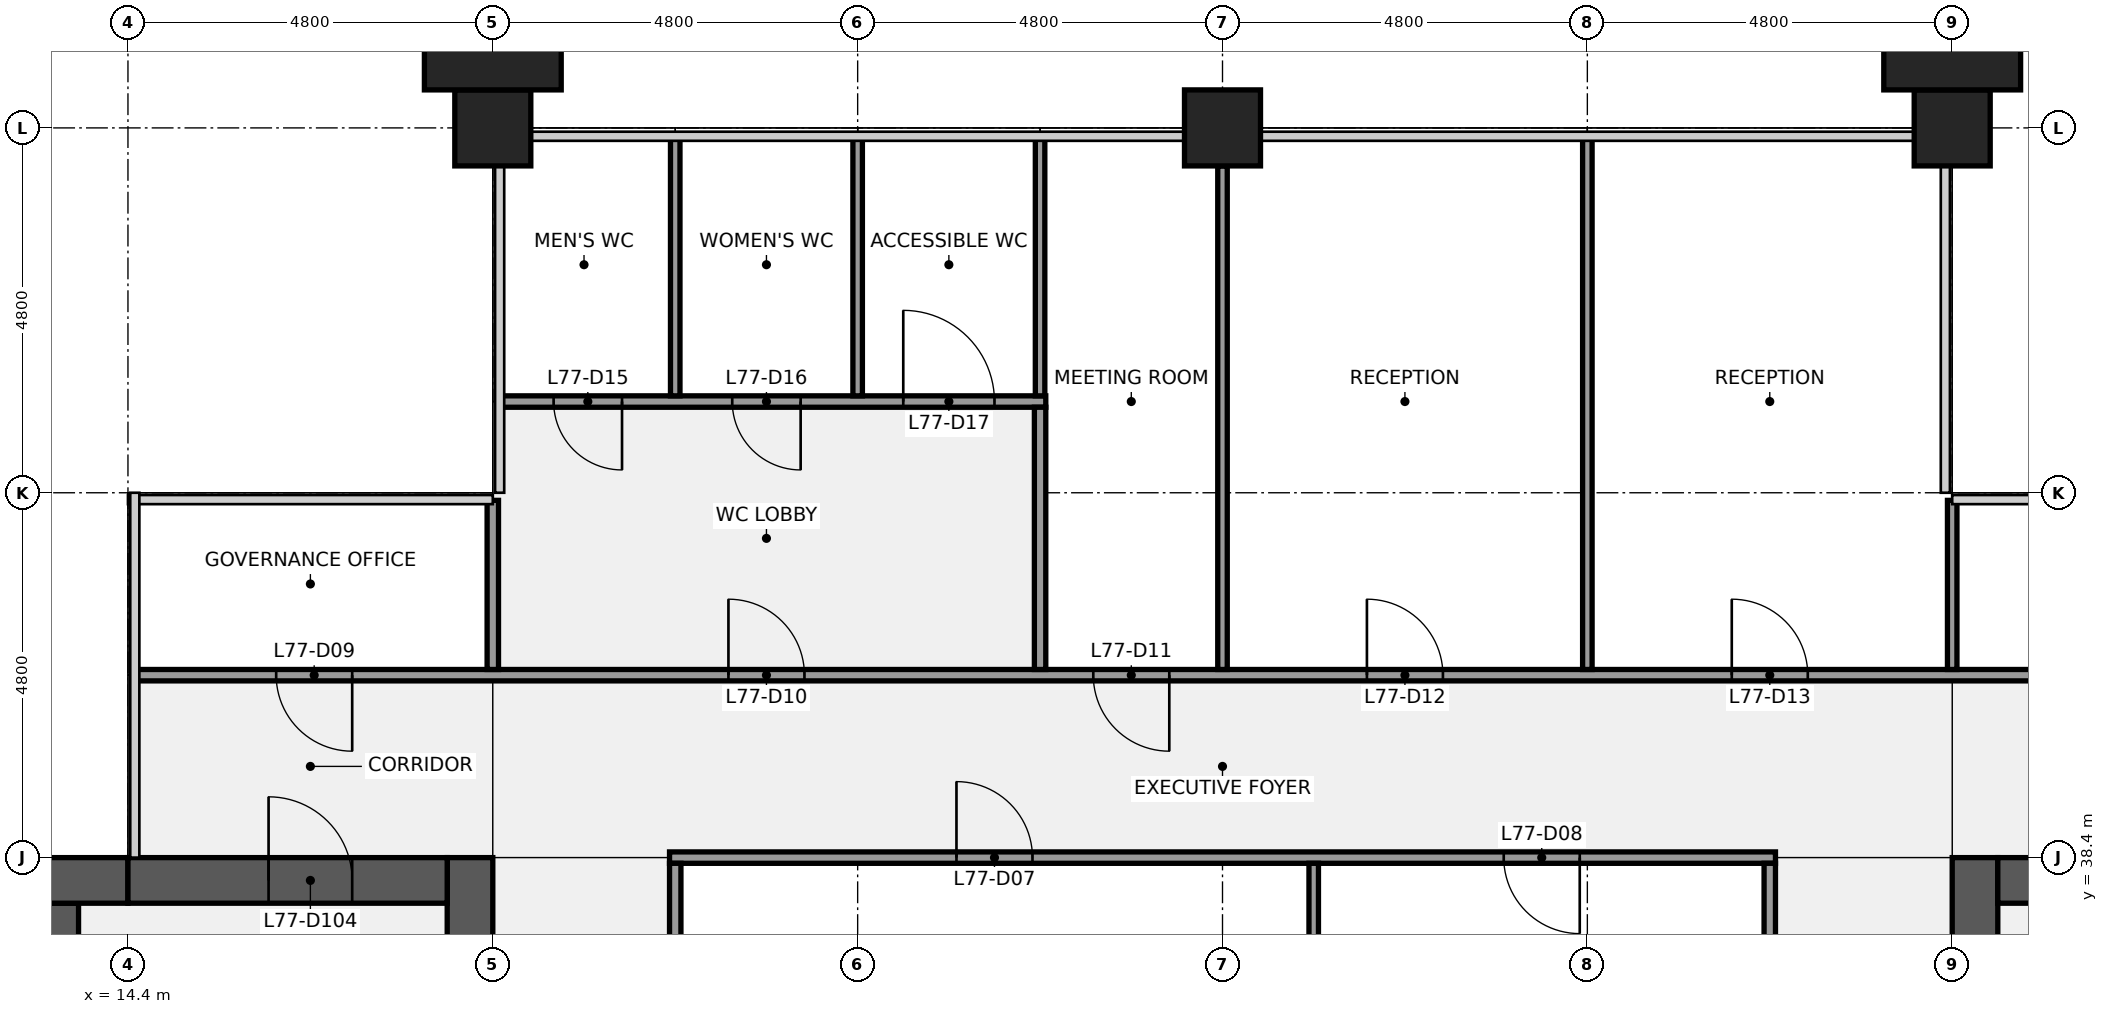
"""IFC4 building model, lengths in metres.
Left out: names, types, materials, properties, quantities, classifications, styles, units other than length and angle.
Written with IfcOpenShell. Run it as: python <this file> out.ifc"""

import sys

from ifc_helpers import new_model, si_unit, direction, frame, frame_2d, origin, origin_2d, place, context, subcontext, project, spatial, rectangle, extrude, element, fill, save


model = new_model("IFC4")
c1 = context("Model", 3, precision=1e-05, world=origin(), true_north=direction((0.0, 1.0)))
c2 = subcontext(c1, "Body", "Model", "MODEL_VIEW")
j1 = project(units=[si_unit("LENGTHUNIT", "METRE"), si_unit("PLANEANGLEUNIT", "RADIAN")], contexts=[c1])
p1 = place(None, origin())
s1 = spatial("IfcSite", under=j1, at=p1, CompositionType="ELEMENT")
p2 = place(p1, origin())
s2 = spatial("IfcBuilding", under=s1, at=p2, CompositionType="ELEMENT")
p3 = place(p2, frame((0.0, 0.0, 346.3)))
s3 = spatial("IfcBuildingStorey", under=s2, at=p3, CompositionType="ELEMENT", Elevation=346.3)
for number, where, z_axis, x_axis in (
    (1, (19.2, 48.0, 0.0), (0.0, 0.0, 1.0), (1.0, 0.0, 0.0)),
    (2, (28.8, 48.0, 0.0), (0.0, 0.0, 1.0), (1.0, 0.0, 0.0)),
    (3, (38.4, 48.0, 0.0), (0.0, 0.0, 1.0), (1.0, 0.0, 0.0)),
):
    element("IfcColumn", number, at=place(p3, frame(where, z_axis=z_axis, x_axis=x_axis)), inside=s3, PredefinedType="COLUMN", context=c2, shape_type="SweptSolid", body=[
        extrude(rectangle(XDim=1.0, YDim=1.0, at=origin_2d()), origin(), (0.0, 0.0, 1.0), 4.0),
    ])
p4 = place(p3, frame((18.9, 38.4, 0.0), z_axis=(0.0, 0.0, 1.0), x_axis=(0.0, -1.0, 0.0)))
e4 = element("IfcWall", 4, at=p4, inside=s3, PredefinedType="SHEAR", context=c2, shape_type="SweptSolid", body=[
    extrude(rectangle(XDim=28.8, YDim=0.6, at=frame_2d((14.4, 0.0))), origin(), (0.0, 0.0, 1.0), 3.84),
])
p5 = place(p4, frame((18.3, 0.0, 0.0)))
e5 = element("IfcOpeningElement", 5, at=p5, cuts=e4, PredefinedType="OPENING", context=c2, shape_type="SweptSolid", body=[
    extrude(rectangle(XDim=1.8, YDim=2.1, at=frame_2d((0.9, 1.05))), frame((0.0, 0.31, 0.0), z_axis=(0.0, -1.0, 0.0), x_axis=(1.0, 0.0, 0.0)), (0.0, 0.0, 1.0), 0.62),
])
p6 = place(p4, frame((8.7, 0.0, 0.0)))
e6 = element("IfcOpeningElement", 6, at=p6, cuts=e4, PredefinedType="OPENING", context=c2, shape_type="SweptSolid", body=[
    extrude(rectangle(XDim=1.8, YDim=2.1, at=frame_2d((0.9, 1.05))), frame((0.0, 0.31, 0.0), z_axis=(0.0, -1.0, 0.0), x_axis=(1.0, 0.0, 0.0)), (0.0, 0.0, 1.0), 0.62),
])
p7 = place(p3, frame((6.25, 37.5, 0.0), z_axis=(0.0, 0.0, 1.0), x_axis=(1.0, 0.0, 0.0)))
e7 = element("IfcWall", 7, at=p7, inside=s3, PredefinedType="SHEAR", context=c2, shape_type="SweptSolid", body=[
    extrude(rectangle(XDim=7.5, YDim=0.6, at=frame_2d((3.75, 0.0))), origin(), (0.0, 0.0, 1.0), 3.84),
])
p8 = place(p3, frame((0.6, 38.1, 0.0), z_axis=(0.0, 0.0, 1.0), x_axis=(1.0, 0.0, 0.0)))
e8 = element("IfcWall", 8, at=p8, inside=s3, PredefinedType="SHEAR", context=c2, shape_type="SweptSolid", body=[
    extrude(rectangle(XDim=13.8, YDim=0.6, at=frame_2d((6.9, 0.0))), origin(), (0.0, 0.0, 1.0), 3.84),
])
p9 = place(p8, frame((5.7, 0.0, 0.9)))
e9 = element("IfcOpeningElement", 9, at=p9, cuts=e8, PredefinedType="OPENING", context=c2, shape_type="SweptSolid", body=[
    extrude(rectangle(XDim=1.8, YDim=1.5, at=frame_2d((0.9, 0.75))), frame((0.0, 0.31, 0.0), z_axis=(0.0, -1.0, 0.0), x_axis=(1.0, 0.0, 0.0)), (0.0, 0.0, 1.0), 0.62),
])
p10 = place(p8, frame((10.5, 0.0, 0.9)))
e10 = element("IfcOpeningElement", 10, at=p10, cuts=e8, PredefinedType="OPENING", context=c2, shape_type="SweptSolid", body=[
    extrude(rectangle(XDim=1.8, YDim=1.5, at=frame_2d((0.9, 0.75))), frame((0.0, 0.31, 0.0), z_axis=(0.0, -1.0, 0.0), x_axis=(1.0, 0.0, 0.0)), (0.0, 0.0, 1.0), 0.62),
])
p11 = place(p3, frame((14.4, 38.1, 0.0), z_axis=(0.0, 0.0, 1.0), x_axis=(1.0, 0.0, 0.0)))
e11 = element("IfcWall", 11, at=p11, inside=s3, PredefinedType="SHEAR", context=c2, shape_type="SweptSolid", body=[
    extrude(rectangle(XDim=4.2, YDim=0.6, at=frame_2d((2.1, 0.0))), origin(), (0.0, 0.0, 1.0), 3.84),
])
p12 = place(p11, frame((1.85, 0.0, 0.0)))
e12 = element("IfcOpeningElement", 12, at=p12, cuts=e11, PredefinedType="OPENING", context=c2, shape_type="SweptSolid", body=[
    extrude(rectangle(XDim=1.1, YDim=2.1, at=frame_2d((0.55, 1.05))), frame((0.0, 0.31, 0.0), z_axis=(0.0, -1.0, 0.0), x_axis=(1.0, 0.0, 0.0)), (0.0, 0.0, 1.0), 0.62),
])
p13 = place(p3, frame((38.7, 9.6, 0.0), z_axis=(0.0, 0.0, 1.0), x_axis=(0.0, 1.0, 0.0)))
e13 = element("IfcWall", 13, at=p13, inside=s3, PredefinedType="SHEAR", context=c2, shape_type="SweptSolid", body=[
    extrude(rectangle(XDim=28.8, YDim=0.6, at=frame_2d((14.4, 0.0))), origin(), (0.0, 0.0, 1.0), 3.84),
])
p14 = place(p13, frame((8.7, 0.0, 0.0)))
e14 = element("IfcOpeningElement", 14, at=p14, cuts=e13, PredefinedType="OPENING", context=c2, shape_type="SweptSolid", body=[
    extrude(rectangle(XDim=1.8, YDim=2.1, at=frame_2d((0.9, 1.05))), frame((0.0, 0.31, 0.0), z_axis=(0.0, -1.0, 0.0), x_axis=(1.0, 0.0, 0.0)), (0.0, 0.0, 1.0), 0.62),
])
p15 = place(p13, frame((18.3, 0.0, 0.0)))
e15 = element("IfcOpeningElement", 15, at=p15, cuts=e13, PredefinedType="OPENING", context=c2, shape_type="SweptSolid", body=[
    extrude(rectangle(XDim=1.8, YDim=2.1, at=frame_2d((0.9, 1.05))), frame((0.0, 0.31, 0.0), z_axis=(0.0, -1.0, 0.0), x_axis=(1.0, 0.0, 0.0)), (0.0, 0.0, 1.0), 0.62),
])
p16 = place(p3, frame((39.0, 38.1, 0.0), z_axis=(0.0, 0.0, 1.0), x_axis=(1.0, 0.0, 0.0)))
e16 = element("IfcWall", 16, at=p16, inside=s3, PredefinedType="SHEAR", context=c2, shape_type="SweptSolid", body=[
    extrude(rectangle(XDim=4.2, YDim=0.6, at=frame_2d((2.1, 0.0))), origin(), (0.0, 0.0, 1.0), 3.84),
])
p17 = place(p16, frame((1.25, 0.0, 0.0)))
e17 = element("IfcOpeningElement", 17, at=p17, cuts=e16, PredefinedType="OPENING", context=c2, shape_type="SweptSolid", body=[
    extrude(rectangle(XDim=1.1, YDim=2.1, at=frame_2d((0.55, 1.05))), frame((0.0, 0.31, 0.0), z_axis=(0.0, -1.0, 0.0), x_axis=(1.0, 0.0, 0.0)), (0.0, 0.0, 1.0), 0.62),
])
p18 = place(p3, frame((21.525, 38.4, 0.0), z_axis=(0.0, 0.0, 1.0), x_axis=(1.0, 0.0, 0.0)))
e18 = element("IfcWall", 18, at=p18, inside=s3, PredefinedType="PARTITIONING", context=c2, shape_type="SweptSolid", body=[
    extrude(rectangle(XDim=14.55, YDim=0.15, at=frame_2d((7.275, 0.0))), origin(), (0.0, 0.0, 1.0), 2.849),
])
p19 = place(p18, frame((3.775, 0.0, 0.0)))
e19 = element("IfcOpeningElement", 19, at=p19, cuts=e18, PredefinedType="OPENING", context=c2, shape_type="SweptSolid", body=[
    extrude(rectangle(XDim=1.0, YDim=2.1, at=frame_2d((0.5, 1.05))), frame((0.0, 0.085, 0.0), z_axis=(0.0, -1.0, 0.0), x_axis=(1.0, 0.0, 0.0)), (0.0, 0.0, 1.0), 0.17),
])
p20 = place(p18, frame((10.975, 0.0, 0.0)))
e20 = element("IfcOpeningElement", 20, at=p20, cuts=e18, PredefinedType="OPENING", context=c2, shape_type="SweptSolid", body=[
    extrude(rectangle(XDim=1.0, YDim=2.1, at=frame_2d((0.5, 1.05))), frame((0.0, 0.085, 0.0), z_axis=(0.0, -1.0, 0.0), x_axis=(1.0, 0.0, 0.0)), (0.0, 0.0, 1.0), 0.17),
])
p21 = place(p3, frame((14.5, 40.8, 0.0), z_axis=(0.0, 0.0, 1.0), x_axis=(1.0, 0.0, 0.0)))
e21 = element("IfcWall", 21, at=p21, inside=s3, PredefinedType="PARTITIONING", context=c2, shape_type="SweptSolid", body=[
    extrude(rectangle(XDim=28.6, YDim=0.15, at=frame_2d((14.3, 0.0))), origin(), (0.0, 0.0, 1.0), 2.849),
])
p22 = place(p21, frame((1.85, 0.0, 0.0)))
e22 = element("IfcOpeningElement", 22, at=p22, cuts=e21, PredefinedType="OPENING", context=c2, shape_type="SweptSolid", body=[
    extrude(rectangle(XDim=1.0, YDim=2.1, at=frame_2d((0.5, 1.05))), frame((0.0, 0.085, 0.0), z_axis=(0.0, -1.0, 0.0), x_axis=(1.0, 0.0, 0.0)), (0.0, 0.0, 1.0), 0.17),
])
p23 = place(p21, frame((7.8, 0.0, 0.0)))
e23 = element("IfcOpeningElement", 23, at=p23, cuts=e21, PredefinedType="OPENING", context=c2, shape_type="SweptSolid", body=[
    extrude(rectangle(XDim=1.0, YDim=2.1, at=frame_2d((0.5, 1.05))), frame((0.0, 0.085, 0.0), z_axis=(0.0, -1.0, 0.0), x_axis=(1.0, 0.0, 0.0)), (0.0, 0.0, 1.0), 0.17),
])
p24 = place(p21, frame((12.6, 0.0, 0.0)))
e24 = element("IfcOpeningElement", 24, at=p24, cuts=e21, PredefinedType="OPENING", context=c2, shape_type="SweptSolid", body=[
    extrude(rectangle(XDim=1.0, YDim=2.1, at=frame_2d((0.5, 1.05))), frame((0.0, 0.085, 0.0), z_axis=(0.0, -1.0, 0.0), x_axis=(1.0, 0.0, 0.0)), (0.0, 0.0, 1.0), 0.17),
])
p25 = place(p21, frame((16.2, 0.0, 0.0)))
e25 = element("IfcOpeningElement", 25, at=p25, cuts=e21, PredefinedType="OPENING", context=c2, shape_type="SweptSolid", body=[
    extrude(rectangle(XDim=1.0, YDim=2.1, at=frame_2d((0.5, 1.05))), frame((0.0, 0.085, 0.0), z_axis=(0.0, -1.0, 0.0), x_axis=(1.0, 0.0, 0.0)), (0.0, 0.0, 1.0), 0.17),
])
p26 = place(p21, frame((21.0, 0.0, 0.0)))
e26 = element("IfcOpeningElement", 26, at=p26, cuts=e21, PredefinedType="OPENING", context=c2, shape_type="SweptSolid", body=[
    extrude(rectangle(XDim=1.0, YDim=2.1, at=frame_2d((0.5, 1.05))), frame((0.0, 0.085, 0.0), z_axis=(0.0, -1.0, 0.0), x_axis=(1.0, 0.0, 0.0)), (0.0, 0.0, 1.0), 0.17),
])
p27 = place(p21, frame((25.75, 0.0, 0.0)))
e27 = element("IfcOpeningElement", 27, at=p27, cuts=e21, PredefinedType="OPENING", context=c2, shape_type="SweptSolid", body=[
    extrude(rectangle(XDim=1.0, YDim=2.1, at=frame_2d((0.5, 1.05))), frame((0.0, 0.085, 0.0), z_axis=(0.0, -1.0, 0.0), x_axis=(1.0, 0.0, 0.0)), (0.0, 0.0, 1.0), 0.17),
])
p28 = place(p3, frame((19.3, 44.4, 0.0), z_axis=(0.0, 0.0, 1.0), x_axis=(1.0, 0.0, 0.0)))
e28 = element("IfcWall", 28, at=p28, inside=s3, PredefinedType="PARTITIONING", context=c2, shape_type="SweptSolid", body=[
    extrude(rectangle(XDim=7.175, YDim=0.15, at=frame_2d((3.587, 0.0))), origin(), (0.0, 0.0, 1.0), 2.849),
])
p29 = place(p28, frame((0.7, 0.0, 0.0)))
e29 = element("IfcOpeningElement", 29, at=p29, cuts=e28, PredefinedType="OPENING", context=c2, shape_type="SweptSolid", body=[
    extrude(rectangle(XDim=0.9, YDim=2.1, at=frame_2d((0.45, 1.05))), frame((0.0, 0.085, 0.0), z_axis=(0.0, -1.0, 0.0), x_axis=(1.0, 0.0, 0.0)), (0.0, 0.0, 1.0), 0.17),
])
p30 = place(p28, frame((3.05, 0.0, 0.0)))
e30 = element("IfcOpeningElement", 30, at=p30, cuts=e28, PredefinedType="OPENING", context=c2, shape_type="SweptSolid", body=[
    extrude(rectangle(XDim=0.9, YDim=2.1, at=frame_2d((0.45, 1.05))), frame((0.0, 0.085, 0.0), z_axis=(0.0, -1.0, 0.0), x_axis=(1.0, 0.0, 0.0)), (0.0, 0.0, 1.0), 0.17),
])
p31 = place(p28, frame((5.3, 0.0, 0.0)))
e31 = element("IfcOpeningElement", 31, at=p31, cuts=e28, PredefinedType="OPENING", context=c2, shape_type="SweptSolid", body=[
    extrude(rectangle(XDim=1.2, YDim=2.1, at=frame_2d((0.6, 1.05))), frame((0.0, 0.085, 0.0), z_axis=(0.0, -1.0, 0.0), x_axis=(1.0, 0.0, 0.0)), (0.0, 0.0, 1.0), 0.17),
])
p32 = place(p3, frame((19.2, 40.875, 0.0), z_axis=(0.0, 0.0, 1.0), x_axis=(0.0, 1.0, 0.0)))
e32 = element("IfcWall", 32, at=p32, inside=s3, PredefinedType="PARTITIONING", context=c2, shape_type="SweptSolid", body=[
    extrude(rectangle(XDim=2.225, YDim=0.15, at=frame_2d((1.113, 0.0))), origin(), (0.0, 0.0, 1.0), 2.849),
])
p33 = place(p3, frame((21.6, 44.475, 0.0), z_axis=(0.0, 0.0, 1.0), x_axis=(0.0, 1.0, 0.0)))
e33 = element("IfcWall", 33, at=p33, inside=s3, PredefinedType="PARTITIONING", context=c2, shape_type="SweptSolid", body=[
    extrude(rectangle(XDim=3.425, YDim=0.125, at=frame_2d((1.712, 0.0))), origin(), (0.0, 0.0, 1.0), 2.849),
])
p34 = place(p3, frame((21.6, 33.675, 0.0), z_axis=(0.0, 0.0, 1.0), x_axis=(0.0, 1.0, 0.0)))
e34 = element("IfcWall", 34, at=p34, inside=s3, PredefinedType="PARTITIONING", context=c2, shape_type="SweptSolid", body=[
    extrude(rectangle(XDim=4.65, YDim=0.15, at=frame_2d((2.325, 0.0))), origin(), (0.0, 0.0, 1.0), 2.849),
])
for number, where, z_axis, x_axis in (
    (35, (24.0, 44.475, 0.0), (0.0, 0.0, 1.0), (0.0, 1.0, 0.0)),
    (36, (26.4, 44.475, 0.0), (0.0, 0.0, 1.0), (0.0, 1.0, 0.0)),
):
    element("IfcWall", number, at=place(p3, frame(where, z_axis=z_axis, x_axis=x_axis)), inside=s3, PredefinedType="PARTITIONING", context=c2, shape_type="SweptSolid", body=[
        extrude(rectangle(XDim=3.425, YDim=0.125, at=frame_2d((1.712, 0.0))), origin(), (0.0, 0.0, 1.0), 2.849),
    ])
p35 = place(p3, frame((26.4, 40.875, 0.0), z_axis=(0.0, 0.0, 1.0), x_axis=(0.0, 1.0, 0.0)))
e37 = element("IfcWall", 37, at=p35, inside=s3, PredefinedType="PARTITIONING", context=c2, shape_type="SweptSolid", body=[
    extrude(rectangle(XDim=3.45, YDim=0.15, at=frame_2d((1.725, 0.0))), origin(), (0.0, 0.0, 1.0), 2.849),
])
p36 = place(p3, frame((28.8, 40.875, 0.0), z_axis=(0.0, 0.0, 1.0), x_axis=(0.0, 1.0, 0.0)))
e38 = element("IfcWall", 38, at=p36, inside=s3, PredefinedType="PARTITIONING", context=c2, shape_type="SweptSolid", body=[
    extrude(rectangle(XDim=6.625, YDim=0.125, at=frame_2d((3.312, 0.0))), origin(), (0.0, 0.0, 1.0), 2.849),
])
p37 = place(p3, frame((30.0, 33.663, 0.0), z_axis=(0.0, 0.0, 1.0), x_axis=(0.0, 1.0, 0.0)))
e39 = element("IfcWall", 39, at=p37, inside=s3, PredefinedType="PARTITIONING", context=c2, shape_type="SweptSolid", body=[
    extrude(rectangle(XDim=4.662, YDim=0.125, at=frame_2d((2.331, 0.0))), origin(), (0.0, 0.0, 1.0), 2.849),
])
p38 = place(p3, frame((33.6, 40.875, 0.0), z_axis=(0.0, 0.0, 1.0), x_axis=(0.0, 1.0, 0.0)))
e40 = element("IfcWall", 40, at=p38, inside=s3, PredefinedType="PARTITIONING", context=c2, shape_type="SweptSolid", body=[
    extrude(rectangle(XDim=7.025, YDim=0.125, at=frame_2d((3.512, 0.0))), origin(), (0.0, 0.0, 1.0), 2.849),
])
p39 = place(p3, frame((36.0, 33.675, 0.0), z_axis=(0.0, 0.0, 1.0), x_axis=(0.0, 1.0, 0.0)))
e41 = element("IfcWall", 41, at=p39, inside=s3, PredefinedType="PARTITIONING", context=c2, shape_type="SweptSolid", body=[
    extrude(rectangle(XDim=4.65, YDim=0.15, at=frame_2d((2.325, 0.0))), origin(), (0.0, 0.0, 1.0), 2.849),
])
p40 = place(p3, frame((38.4, 40.875, 0.0), z_axis=(0.0, 0.0, 1.0), x_axis=(0.0, 1.0, 0.0)))
e42 = element("IfcWall", 42, at=p40, inside=s3, PredefinedType="PARTITIONING", context=c2, shape_type="SweptSolid", body=[
    extrude(rectangle(XDim=2.225, YDim=0.125, at=frame_2d((1.113, 0.0))), origin(), (0.0, 0.0, 1.0), 2.849),
])
for number, where, z_axis, x_axis in (
    (43, (19.2, 49.0, 0.0), (0.0, 0.0, 1.0), (1.0, 0.0, 0.0)),
    (44, (38.4, 49.0, 0.0), (0.0, 0.0, 1.0), (1.0, 0.0, 0.0)),
):
    element("IfcColumn", number, at=place(p3, frame(where, z_axis=z_axis, x_axis=x_axis)), inside=s3, PredefinedType="PILASTER", context=c2, shape_type="SweptSolid", body=[
        extrude(rectangle(XDim=1.8, YDim=1.0, at=origin_2d()), origin(), (0.0, 0.0, 1.0), 4.0),
    ])
p41 = place(p12, origin())
e45 = element("IfcDoor", 45, at=p41, inside=s3, OperationType="SINGLE_SWING_LEFT", PredefinedType="DOOR", context=c2, shape_type="SweptSolid", body=[
    extrude(rectangle(XDim=1.1, YDim=2.1, at=frame_2d((0.55, 1.05))), frame((0.0, 0.025, 0.0), z_axis=(0.0, -1.0, 0.0), x_axis=(1.0, 0.0, 0.0)), (0.0, 0.0, 1.0), 0.05),
])
fill(e12, e45)
p42 = place(p19, origin())
e46 = element("IfcDoor", 46, at=p42, inside=s3, OperationType="SINGLE_SWING_LEFT", PredefinedType="DOOR", context=c2, shape_type="SweptSolid", body=[
    extrude(rectangle(XDim=1.0, YDim=2.1, at=frame_2d((0.5, 1.05))), frame((0.0, 0.025, 0.0), z_axis=(0.0, -1.0, 0.0), x_axis=(1.0, 0.0, 0.0)), (0.0, 0.0, 1.0), 0.05),
])
fill(e19, e46)
p43 = place(p20, origin())
e47 = element("IfcDoor", 47, at=p43, inside=s3, OperationType="SINGLE_SWING_RIGHT", PredefinedType="DOOR", context=c2, shape_type="SweptSolid", body=[
    extrude(rectangle(XDim=1.0, YDim=2.1, at=frame_2d((0.5, 1.05))), frame((0.0, 0.025, 0.0), z_axis=(0.0, -1.0, 0.0), x_axis=(1.0, 0.0, 0.0)), (0.0, 0.0, 1.0), 0.05),
])
fill(e20, e47)
p44 = place(p22, origin())
e48 = element("IfcDoor", 48, at=p44, inside=s3, OperationType="SINGLE_SWING_RIGHT", PredefinedType="DOOR", context=c2, shape_type="SweptSolid", body=[
    extrude(rectangle(XDim=1.0, YDim=2.1, at=frame_2d((0.5, 1.05))), frame((0.0, 0.025, 0.0), z_axis=(0.0, -1.0, 0.0), x_axis=(1.0, 0.0, 0.0)), (0.0, 0.0, 1.0), 0.05),
])
fill(e22, e48)
p45 = place(p23, origin())
e49 = element("IfcDoor", 49, at=p45, inside=s3, OperationType="SINGLE_SWING_LEFT", PredefinedType="DOOR", context=c2, shape_type="SweptSolid", body=[
    extrude(rectangle(XDim=1.0, YDim=2.1, at=frame_2d((0.5, 1.05))), frame((0.0, 0.025, 0.0), z_axis=(0.0, -1.0, 0.0), x_axis=(1.0, 0.0, 0.0)), (0.0, 0.0, 1.0), 0.05),
])
fill(e23, e49)
p46 = place(p24, origin())
e50 = element("IfcDoor", 50, at=p46, inside=s3, OperationType="SINGLE_SWING_RIGHT", PredefinedType="DOOR", context=c2, shape_type="SweptSolid", body=[
    extrude(rectangle(XDim=1.0, YDim=2.1, at=frame_2d((0.5, 1.05))), frame((0.0, 0.025, 0.0), z_axis=(0.0, -1.0, 0.0), x_axis=(1.0, 0.0, 0.0)), (0.0, 0.0, 1.0), 0.05),
])
fill(e24, e50)
p47 = place(p25, origin())
e51 = element("IfcDoor", 51, at=p47, inside=s3, OperationType="SINGLE_SWING_LEFT", PredefinedType="DOOR", context=c2, shape_type="SweptSolid", body=[
    extrude(rectangle(XDim=1.0, YDim=2.1, at=frame_2d((0.5, 1.05))), frame((0.0, 0.025, 0.0), z_axis=(0.0, -1.0, 0.0), x_axis=(1.0, 0.0, 0.0)), (0.0, 0.0, 1.0), 0.05),
])
fill(e25, e51)
p48 = place(p26, origin())
e52 = element("IfcDoor", 52, at=p48, inside=s3, OperationType="SINGLE_SWING_LEFT", PredefinedType="DOOR", context=c2, shape_type="SweptSolid", body=[
    extrude(rectangle(XDim=1.0, YDim=2.1, at=frame_2d((0.5, 1.05))), frame((0.0, 0.025, 0.0), z_axis=(0.0, -1.0, 0.0), x_axis=(1.0, 0.0, 0.0)), (0.0, 0.0, 1.0), 0.05),
])
fill(e26, e52)
p49 = place(p29, origin())
e53 = element("IfcDoor", 53, at=p49, inside=s3, OperationType="SINGLE_SWING_RIGHT", PredefinedType="DOOR", context=c2, shape_type="SweptSolid", body=[
    extrude(rectangle(XDim=0.9, YDim=2.1, at=frame_2d((0.45, 1.05))), frame((0.0, 0.025, 0.0), z_axis=(0.0, -1.0, 0.0), x_axis=(1.0, 0.0, 0.0)), (0.0, 0.0, 1.0), 0.05),
])
fill(e29, e53)
p50 = place(p30, origin())
e54 = element("IfcDoor", 54, at=p50, inside=s3, OperationType="SINGLE_SWING_RIGHT", PredefinedType="DOOR", context=c2, shape_type="SweptSolid", body=[
    extrude(rectangle(XDim=0.9, YDim=2.1, at=frame_2d((0.45, 1.05))), frame((0.0, 0.025, 0.0), z_axis=(0.0, -1.0, 0.0), x_axis=(1.0, 0.0, 0.0)), (0.0, 0.0, 1.0), 0.05),
])
fill(e30, e54)
p51 = place(p31, origin())
e55 = element("IfcDoor", 55, at=p51, inside=s3, OperationType="SINGLE_SWING_LEFT", PredefinedType="DOOR", context=c2, shape_type="SweptSolid", body=[
    extrude(rectangle(XDim=1.2, YDim=2.1, at=frame_2d((0.6, 1.05))), frame((0.0, 0.025, 0.0), z_axis=(0.0, -1.0, 0.0), x_axis=(1.0, 0.0, 0.0)), (0.0, 0.0, 1.0), 0.05),
])
fill(e31, e55)
save(model, sys.argv[1])
